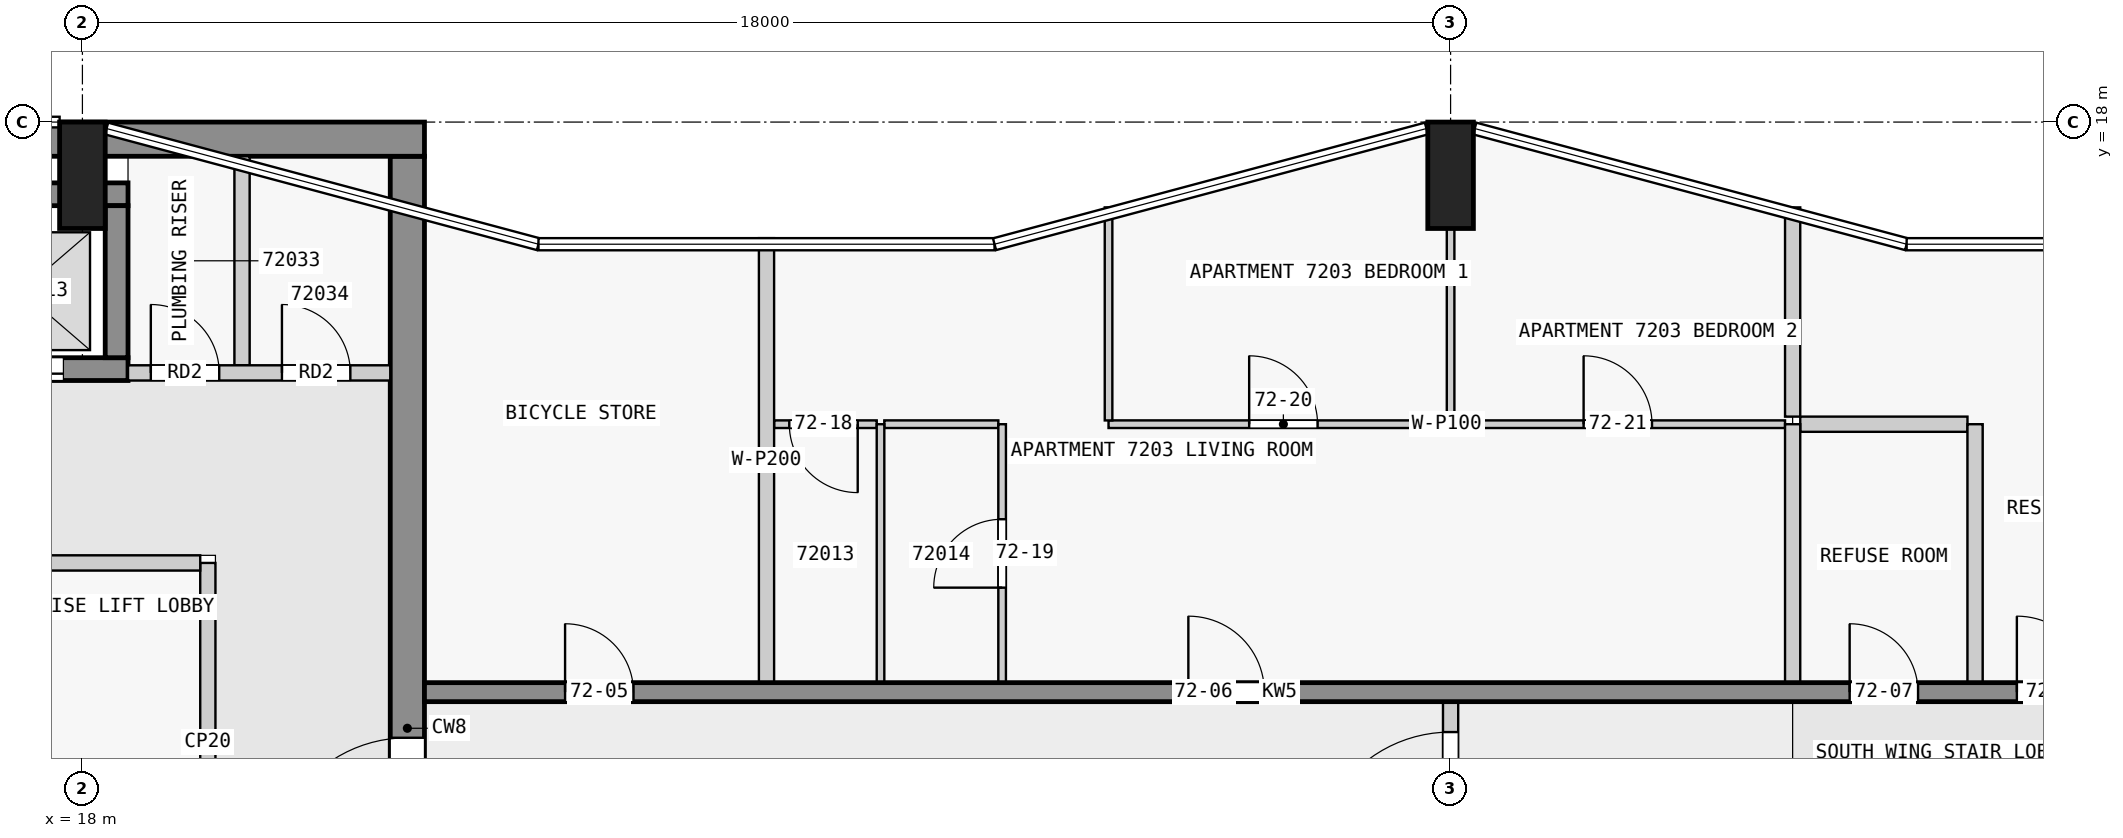
"""IFC4 building model, lengths in metres.
Left out: names, types, materials, properties, quantities, classifications, styles, units other than length and angle.
Written with IfcOpenShell. Run it as: python <this file> out.ifc"""

import sys

from ifc_helpers import new_model, si_unit, direction, frame, frame_2d, origin, origin_2d, place, context, subcontext, project, spatial, rectangle, extrude, element, fill, save


model = new_model("IFC4")
c1 = context("Model", 3, precision=1e-05, world=origin(), true_north=direction((0.0, 1.0)))
c2 = subcontext(c1, "Body", "Model", "MODEL_VIEW")
j1 = project(units=[si_unit("LENGTHUNIT", "METRE"), si_unit("PLANEANGLEUNIT", "RADIAN")], contexts=[c1])
p1 = place(None, origin())
s1 = spatial("IfcSite", under=j1, at=p1, CompositionType="ELEMENT")
p2 = place(p1, origin())
s2 = spatial("IfcBuilding", under=s1, at=p2, CompositionType="ELEMENT")
p3 = place(p2, frame((0.0, 0.0, 273.9)))
s3 = spatial("IfcBuildingStorey", under=s2, at=p3, CompositionType="ELEMENT", Elevation=273.9)
for number, where, z_axis, x_axis in (
    (1, (36.0, 17.3, 0.0), (0.0, 0.0, 1.0), (1.0, 0.0, 0.0)),
    (2, (18.0, 17.3, 0.0), (0.0, 0.0, 1.0), (1.0, 0.0, 0.0)),
):
    element("IfcColumn", number, at=place(p3, frame(where, z_axis=z_axis, x_axis=x_axis)), inside=s3, PredefinedType="COLUMN", context=c2, shape_type="SweptSolid", body=[
        extrude(rectangle(XDim=0.6, YDim=1.4, at=origin_2d()), origin(), (0.0, 0.0, 1.0), 3.5),
    ])
p4 = place(p3, frame((1.85, 17.775, 0.0), z_axis=(0.0, 0.0, 1.0), x_axis=(1.0, 0.0, 0.0)))
e3 = element("IfcWall", 3, at=p4, inside=s3, PredefinedType="SHEAR", context=c2, shape_type="SweptSolid", body=[
    extrude(rectangle(XDim=20.65, YDim=0.45, at=frame_2d((10.325, 0.0))), origin(), (0.0, 0.0, 1.0), 3.25),
])
p5 = place(p3, frame((22.275, 2.5, 0.0), z_axis=(0.0, 0.0, 1.0), x_axis=(0.0, 1.0, 0.0)))
e4 = element("IfcWall", 4, at=p5, inside=s3, PredefinedType="SHEAR", context=c2, shape_type="SweptSolid", body=[
    extrude(rectangle(XDim=15.05, YDim=0.45, at=frame_2d((7.525, 0.0))), origin(), (0.0, 0.0, 1.0), 3.25),
])
p6 = place(p5, frame((5.6, 0.0, 0.0)))
e5 = element("IfcOpeningElement", 5, at=p6, cuts=e4, PredefinedType="OPENING", context=c2, shape_type="SweptSolid", body=[
    extrude(rectangle(XDim=1.8, YDim=2.1, at=frame_2d((0.9, 1.05))), frame((0.0, 0.235, 0.0), z_axis=(0.0, -1.0, 0.0), x_axis=(1.0, 0.0, 0.0)), (0.0, 0.0, 1.0), 0.47),
])
p7 = place(p3, frame((10.8, 17.05, 0.0), z_axis=(0.0, 0.0, 1.0), x_axis=(1.0, 0.0, 0.0)))
e6 = element("IfcWall", 6, at=p7, inside=s3, PredefinedType="SHEAR", context=c2, shape_type="SweptSolid", body=[
    extrude(rectangle(XDim=7.8, YDim=0.3, at=frame_2d((3.9, 0.0))), origin(), (0.0, 0.0, 1.0), 3.25),
])
p8 = place(p3, frame((10.8, 14.75, 0.0), z_axis=(0.0, 0.0, 1.0), x_axis=(1.0, 0.0, 0.0)))
e7 = element("IfcWall", 7, at=p8, inside=s3, PredefinedType="SHEAR", context=c2, shape_type="SweptSolid", body=[
    extrude(rectangle(XDim=7.8, YDim=0.3, at=frame_2d((3.9, 0.0))), origin(), (0.0, 0.0, 1.0), 3.25),
])
p9 = place(p8, frame((0.85, 0.0, 0.0)))
e8 = element("IfcOpeningElement", 8, at=p9, cuts=e7, PredefinedType="OPENING", context=c2, shape_type="SweptSolid", body=[
    extrude(rectangle(XDim=1.1, YDim=2.1, at=frame_2d((0.55, 1.05))), frame((0.0, 0.16, 0.0), z_axis=(0.0, -1.0, 0.0), x_axis=(1.0, 0.0, 0.0)), (0.0, 0.0, 1.0), 0.32),
])
p10 = place(p8, frame((3.35, 0.0, 0.0)))
e9 = element("IfcOpeningElement", 9, at=p10, cuts=e7, PredefinedType="OPENING", context=c2, shape_type="SweptSolid", body=[
    extrude(rectangle(XDim=1.1, YDim=2.1, at=frame_2d((0.55, 1.05))), frame((0.0, 0.16, 0.0), z_axis=(0.0, -1.0, 0.0), x_axis=(1.0, 0.0, 0.0)), (0.0, 0.0, 1.0), 0.32),
])
p11 = place(p8, frame((5.85, 0.0, 0.0)))
e10 = element("IfcOpeningElement", 10, at=p11, cuts=e7, PredefinedType="OPENING", context=c2, shape_type="SweptSolid", body=[
    extrude(rectangle(XDim=1.1, YDim=2.1, at=frame_2d((0.55, 1.05))), frame((0.0, 0.16, 0.0), z_axis=(0.0, -1.0, 0.0), x_axis=(1.0, 0.0, 0.0)), (0.0, 0.0, 1.0), 0.32),
])
p12 = place(p3, frame((18.45, 14.9, 0.0), z_axis=(0.0, 0.0, 1.0), x_axis=(0.0, 1.0, 0.0)))
e11 = element("IfcWall", 11, at=p12, inside=s3, PredefinedType="SHEAR", context=c2, shape_type="SweptSolid", body=[
    extrude(rectangle(XDim=2.0, YDim=0.3, at=frame_2d((1.0, 0.0))), origin(), (0.0, 0.0, 1.0), 3.25),
])
p13 = place(p3, frame((22.5, 10.5, 0.0), z_axis=(0.0, 0.0, 1.0), x_axis=(1.0, 0.0, 0.0)))
e12 = element("IfcWall", 12, at=p13, inside=s3, PredefinedType="SHEAR", context=c2, shape_type="SweptSolid", body=[
    extrude(rectangle(XDim=22.5, YDim=0.25, at=frame_2d((11.25, 0.0))), origin(), (0.0, 0.0, 1.0), 3.25),
])
p14 = place(p13, frame((1.85, 0.0, 0.0)))
e13 = element("IfcOpeningElement", 13, at=p14, cuts=e12, PredefinedType="OPENING", context=c2, shape_type="SweptSolid", body=[
    extrude(rectangle(XDim=0.9, YDim=2.1, at=frame_2d((0.45, 1.05))), frame((0.0, 0.135, 0.0), z_axis=(0.0, -1.0, 0.0), x_axis=(1.0, 0.0, 0.0)), (0.0, 0.0, 1.0), 0.27),
])
p15 = place(p13, frame((10.05, 0.0, 0.0)))
e14 = element("IfcOpeningElement", 14, at=p15, cuts=e12, PredefinedType="OPENING", context=c2, shape_type="SweptSolid", body=[
    extrude(rectangle(XDim=1.0, YDim=2.1, at=frame_2d((0.5, 1.05))), frame((0.0, 0.135, 0.0), z_axis=(0.0, -1.0, 0.0), x_axis=(1.0, 0.0, 0.0)), (0.0, 0.0, 1.0), 0.27),
])
p16 = place(p13, frame((18.75, 0.0, 0.0)))
e15 = element("IfcOpeningElement", 15, at=p16, cuts=e12, PredefinedType="OPENING", context=c2, shape_type="SweptSolid", body=[
    extrude(rectangle(XDim=0.9, YDim=2.1, at=frame_2d((0.45, 1.05))), frame((0.0, 0.135, 0.0), z_axis=(0.0, -1.0, 0.0), x_axis=(1.0, 0.0, 0.0)), (0.0, 0.0, 1.0), 0.27),
])
p17 = place(p13, frame((20.95, 0.0, 0.0)))
e16 = element("IfcOpeningElement", 16, at=p17, cuts=e12, PredefinedType="OPENING", context=c2, shape_type="SweptSolid", body=[
    extrude(rectangle(XDim=1.0, YDim=2.1, at=frame_2d((0.5, 1.05))), frame((0.0, 0.135, 0.0), z_axis=(0.0, -1.0, 0.0), x_axis=(1.0, 0.0, 0.0)), (0.0, 0.0, 1.0), 0.27),
])
p18 = place(p3, frame((19.65, 7.5, 0.0), z_axis=(0.0, 0.0, 1.0), x_axis=(0.0, 1.0, 0.0)))
e17 = element("IfcWall", 17, at=p18, inside=s3, PredefinedType="PARTITIONING", context=c2, shape_type="SweptSolid", body=[
    extrude(rectangle(XDim=4.7, YDim=0.2, at=frame_2d((2.35, 0.0))), origin(), (0.0, 0.0, 1.0), 3.25),
])
p19 = place(p3, frame((10.9, 12.2, 0.0), z_axis=(0.0, 0.0, 1.0), x_axis=(1.0, 0.0, 0.0)))
e18 = element("IfcWall", 18, at=p19, inside=s3, PredefinedType="PARTITIONING", context=c2, shape_type="SweptSolid", body=[
    extrude(rectangle(XDim=8.65, YDim=0.2, at=frame_2d((4.325, 0.0))), origin(), (0.0, 0.0, 1.0), 3.25),
])
p20 = place(p19, frame((3.875, 0.0, 0.0)))
e19 = element("IfcOpeningElement", 19, at=p20, cuts=e18, PredefinedType="OPENING", context=c2, shape_type="SweptSolid", body=[
    extrude(rectangle(XDim=0.9, YDim=2.1, at=frame_2d((0.45, 1.05))), frame((0.0, 0.11, 0.0), z_axis=(0.0, -1.0, 0.0), x_axis=(1.0, 0.0, 0.0)), (0.0, 0.0, 1.0), 0.22),
])
p21 = place(p3, frame((18.6, 14.7, 0.0), z_axis=(0.0, 0.0, 1.0), x_axis=(1.0, 0.0, 0.0)))
e20 = element("IfcWall", 20, at=p21, inside=s3, PredefinedType="PARTITIONING", context=c2, shape_type="SweptSolid", body=[
    extrude(rectangle(XDim=3.45, YDim=0.2, at=frame_2d((1.725, 0.0))), origin(), (0.0, 0.0, 1.0), 3.25),
])
p22 = place(p21, frame((0.3, 0.0, 0.0)))
e21 = element("IfcOpeningElement", 21, at=p22, cuts=e20, PredefinedType="OPENING", context=c2, shape_type="SweptSolid", body=[
    extrude(rectangle(XDim=0.9, YDim=2.1, at=frame_2d((0.45, 1.05))), frame((0.0, 0.11, 0.0), z_axis=(0.0, -1.0, 0.0), x_axis=(1.0, 0.0, 0.0)), (0.0, 0.0, 1.0), 0.22),
])
p23 = place(p21, frame((2.025, 0.0, 0.0)))
e22 = element("IfcOpeningElement", 22, at=p23, cuts=e20, PredefinedType="OPENING", context=c2, shape_type="SweptSolid", body=[
    extrude(rectangle(XDim=0.9, YDim=2.1, at=frame_2d((0.45, 1.05))), frame((0.0, 0.11, 0.0), z_axis=(0.0, -1.0, 0.0), x_axis=(1.0, 0.0, 0.0)), (0.0, 0.0, 1.0), 0.22),
])
p24 = place(p3, frame((20.1, 14.8, 0.0), z_axis=(0.0, 0.0, 1.0), x_axis=(0.0, 1.0, 0.0)))
e23 = element("IfcWall", 23, at=p24, inside=s3, PredefinedType="PARTITIONING", context=c2, shape_type="SweptSolid", body=[
    extrude(rectangle(XDim=2.75, YDim=0.2, at=frame_2d((1.375, 0.0))), origin(), (0.0, 0.0, 1.0), 3.25),
])
p25 = place(p3, frame((28.45, 14.025, 0.0), z_axis=(0.0, 0.0, 1.0), x_axis=(-1.0, 0.0, 0.0)))
e24 = element("IfcWall", 24, at=p25, inside=s3, PredefinedType="PARTITIONING", context=c2, shape_type="SweptSolid", body=[
    extrude(rectangle(XDim=1.35, YDim=0.1, at=frame_2d((0.675, 0.0))), origin(), (0.0, 0.0, 1.0), 3.25),
])
p26 = place(p25, frame((0.25, 0.0, 0.0)))
e25 = element("IfcOpeningElement", 25, at=p26, cuts=e24, PredefinedType="OPENING", context=c2, shape_type="SweptSolid", body=[
    extrude(rectangle(XDim=0.9, YDim=2.1, at=frame_2d((0.45, 1.05))), frame((0.0, 0.06, 0.0), z_axis=(0.0, -1.0, 0.0), x_axis=(1.0, 0.0, 0.0)), (0.0, 0.0, 1.0), 0.12),
])
p27 = place(p3, frame((30.05, 14.025, 0.0), z_axis=(0.0, 0.0, 1.0), x_axis=(-1.0, 0.0, 0.0)))
e26 = element("IfcWall", 26, at=p27, inside=s3, PredefinedType="PARTITIONING", context=c2, shape_type="SweptSolid", body=[
    extrude(rectangle(XDim=1.5, YDim=0.1, at=frame_2d((0.75, 0.0))), origin(), (0.0, 0.0, 1.0), 3.25),
])
p28 = place(p3, frame((31.5, 14.025, 0.0), z_axis=(0.0, 0.0, 1.0), x_axis=(1.0, 0.0, 0.0)))
e27 = element("IfcWall", 27, at=p28, inside=s3, PredefinedType="PARTITIONING", context=c2, shape_type="SweptSolid", body=[
    extrude(rectangle(XDim=8.9, YDim=0.1, at=frame_2d((4.45, 0.0))), origin(), (0.0, 0.0, 1.0), 3.25),
])
p29 = place(p28, frame((1.85, 0.0, 0.0)))
e28 = element("IfcOpeningElement", 28, at=p29, cuts=e27, PredefinedType="OPENING", context=c2, shape_type="SweptSolid", body=[
    extrude(rectangle(XDim=0.9, YDim=2.1, at=frame_2d((0.45, 1.05))), frame((0.0, 0.06, 0.0), z_axis=(0.0, -1.0, 0.0), x_axis=(1.0, 0.0, 0.0)), (0.0, 0.0, 1.0), 0.12),
])
p30 = place(p28, frame((6.25, 0.0, 0.0)))
e29 = element("IfcOpeningElement", 29, at=p30, cuts=e27, PredefinedType="OPENING", context=c2, shape_type="SweptSolid", body=[
    extrude(rectangle(XDim=0.9, YDim=2.1, at=frame_2d((0.45, 1.05))), frame((0.0, 0.06, 0.0), z_axis=(0.0, -1.0, 0.0), x_axis=(1.0, 0.0, 0.0)), (0.0, 0.0, 1.0), 0.12),
])
p31 = place(p3, frame((42.8, 14.025, 0.0), z_axis=(0.0, 0.0, 1.0), x_axis=(-1.0, 0.0, 0.0)))
e30 = element("IfcWall", 30, at=p31, inside=s3, PredefinedType="PARTITIONING", context=c2, shape_type="SweptSolid", body=[
    extrude(rectangle(XDim=2.2, YDim=0.2, at=frame_2d((1.1, 0.0))), origin(), (0.0, 0.0, 1.0), 3.25),
])
p32 = place(p3, frame((27.0, 10.625, 0.0), z_axis=(0.0, 0.0, 1.0), x_axis=(0.0, 1.0, 0.0)))
e31 = element("IfcWall", 31, at=p32, inside=s3, PredefinedType="PARTITIONING", context=c2, shape_type="SweptSolid", body=[
    extrude(rectangle(XDim=5.848, YDim=0.2, at=frame_2d((2.924, 0.0))), origin(), (0.0, 0.0, 1.0), 3.25),
])
p33 = place(p3, frame((28.5, 10.625, 0.0), z_axis=(0.0, 0.0, 1.0), x_axis=(0.0, 1.0, 0.0)))
e32 = element("IfcWall", 32, at=p33, inside=s3, PredefinedType="PARTITIONING", context=c2, shape_type="SweptSolid", body=[
    extrude(rectangle(XDim=3.4, YDim=0.1, at=frame_2d((1.7, 0.0))), origin(), (0.0, 0.0, 1.0), 3.25),
])
p34 = place(p3, frame((30.1, 10.625, 0.0), z_axis=(0.0, 0.0, 1.0), x_axis=(0.0, 1.0, 0.0)))
e33 = element("IfcWall", 33, at=p34, inside=s3, PredefinedType="PARTITIONING", context=c2, shape_type="SweptSolid", body=[
    extrude(rectangle(XDim=3.4, YDim=0.1, at=frame_2d((1.7, 0.0))), origin(), (0.0, 0.0, 1.0), 3.25),
])
p35 = place(p34, frame((1.25, 0.0, 0.0)))
e34 = element("IfcOpeningElement", 34, at=p35, cuts=e33, PredefinedType="OPENING", context=c2, shape_type="SweptSolid", body=[
    extrude(rectangle(XDim=0.9, YDim=2.1, at=frame_2d((0.45, 1.05))), frame((0.0, 0.06, 0.0), z_axis=(0.0, -1.0, 0.0), x_axis=(1.0, 0.0, 0.0)), (0.0, 0.0, 1.0), 0.12),
])
p36 = place(p3, frame((31.5, 16.878, 0.0), z_axis=(0.0, 0.0, 1.0), x_axis=(0.0, -1.0, 0.0)))
e35 = element("IfcWall", 35, at=p36, inside=s3, PredefinedType="PARTITIONING", context=c2, shape_type="SweptSolid", body=[
    extrude(rectangle(XDim=2.803, YDim=0.1, at=frame_2d((1.401, 0.0))), origin(), (0.0, 0.0, 1.0), 3.25),
])
p37 = place(p3, frame((36.0, 14.075, 0.0), z_axis=(0.0, 0.0, 1.0), x_axis=(0.0, 1.0, 0.0)))
e36 = element("IfcWall", 36, at=p37, inside=s3, PredefinedType="PARTITIONING", context=c2, shape_type="SweptSolid", body=[
    extrude(rectangle(XDim=2.525, YDim=0.1, at=frame_2d((1.263, 0.0))), origin(), (0.0, 0.0, 1.0), 3.25),
])
p38 = place(p3, frame((40.5, 14.025, 0.0), z_axis=(0.0, 0.0, 1.0), x_axis=(0.0, -1.0, 0.0)))
e37 = element("IfcWall", 37, at=p38, inside=s3, PredefinedType="PARTITIONING", context=c2, shape_type="SweptSolid", body=[
    extrude(rectangle(XDim=3.4, YDim=0.2, at=frame_2d((1.7, 0.0))), origin(), (0.0, 0.0, 1.0), 3.25),
])
p39 = place(p3, frame((40.5, 14.125, 0.0), z_axis=(0.0, 0.0, 1.0), x_axis=(0.0, 1.0, 0.0)))
e38 = element("IfcWall", 38, at=p39, inside=s3, PredefinedType="PARTITIONING", context=c2, shape_type="SweptSolid", body=[
    extrude(rectangle(XDim=2.753, YDim=0.2, at=frame_2d((1.376, 0.0))), origin(), (0.0, 0.0, 1.0), 3.25),
])
p40 = place(p3, frame((42.9, 10.625, 0.0), z_axis=(0.0, 0.0, 1.0), x_axis=(0.0, 1.0, 0.0)))
e39 = element("IfcWall", 39, at=p40, inside=s3, PredefinedType="PARTITIONING", context=c2, shape_type="SweptSolid", body=[
    extrude(rectangle(XDim=3.4, YDim=0.2, at=frame_2d((1.7, 0.0))), origin(), (0.0, 0.0, 1.0), 3.25),
])
p41 = place(p3, frame((36.0, 7.475, 0.0), z_axis=(0.0, 0.0, 1.0), x_axis=(0.0, 1.0, 0.0)))
e40 = element("IfcWall", 40, at=p41, inside=s3, PredefinedType="PARTITIONING", context=c2, shape_type="SweptSolid", body=[
    extrude(rectangle(XDim=3.15, YDim=0.2, at=frame_2d((1.575, 0.0))), origin(), (0.0, 0.0, 1.0), 3.25),
])
p42 = place(p41, frame((0.7, 0.0, 0.0)))
e41 = element("IfcOpeningElement", 41, at=p42, cuts=e40, PredefinedType="OPENING", context=c2, shape_type="SweptSolid", body=[
    extrude(rectangle(XDim=1.8, YDim=2.1, at=frame_2d((0.9, 1.05))), frame((0.0, 0.11, 0.0), z_axis=(0.0, -1.0, 0.0), x_axis=(1.0, 0.0, 0.0)), (0.0, 0.0, 1.0), 0.22),
])
p43 = place(p11, origin())
e42 = element("IfcDoor", 42, at=p43, inside=s3, OperationType="DOUBLE_DOOR_SLIDING", PredefinedType="DOOR", context=c2, shape_type="SweptSolid", body=[
    extrude(rectangle(XDim=1.1, YDim=2.1, at=frame_2d((0.55, 1.05))), frame((0.0, 0.025, 0.0), z_axis=(0.0, -1.0, 0.0), x_axis=(1.0, 0.0, 0.0)), (0.0, 0.0, 1.0), 0.05),
])
fill(e10, e42)
p44 = place(p6, origin())
e43 = element("IfcDoor", 43, at=p44, inside=s3, OperationType="DOUBLE_DOOR_SINGLE_SWING", PredefinedType="DOOR", context=c2, shape_type="SweptSolid", body=[
    extrude(rectangle(XDim=1.8, YDim=2.1, at=frame_2d((0.9, 1.05))), frame((0.0, 0.025, 0.0), z_axis=(0.0, -1.0, 0.0), x_axis=(1.0, 0.0, 0.0)), (0.0, 0.0, 1.0), 0.05),
])
fill(e5, e43)
p45 = place(p22, origin())
e44 = element("IfcDoor", 44, at=p45, inside=s3, OperationType="SINGLE_SWING_LEFT", PredefinedType="DOOR", context=c2, shape_type="SweptSolid", body=[
    extrude(rectangle(XDim=0.9, YDim=2.1, at=frame_2d((0.45, 1.05))), frame((0.0, 0.025, 0.0), z_axis=(0.0, -1.0, 0.0), x_axis=(1.0, 0.0, 0.0)), (0.0, 0.0, 1.0), 0.05),
])
fill(e21, e44)
p46 = place(p23, origin())
e45 = element("IfcDoor", 45, at=p46, inside=s3, OperationType="SINGLE_SWING_LEFT", PredefinedType="DOOR", context=c2, shape_type="SweptSolid", body=[
    extrude(rectangle(XDim=0.9, YDim=2.1, at=frame_2d((0.45, 1.05))), frame((0.0, 0.025, 0.0), z_axis=(0.0, -1.0, 0.0), x_axis=(1.0, 0.0, 0.0)), (0.0, 0.0, 1.0), 0.05),
])
fill(e22, e45)
p47 = place(p14, origin())
e46 = element("IfcDoor", 46, at=p47, inside=s3, OperationType="SINGLE_SWING_LEFT", PredefinedType="DOOR", context=c2, shape_type="SweptSolid", body=[
    extrude(rectangle(XDim=0.9, YDim=2.1, at=frame_2d((0.45, 1.05))), frame((0.0, 0.025, 0.0), z_axis=(0.0, -1.0, 0.0), x_axis=(1.0, 0.0, 0.0)), (0.0, 0.0, 1.0), 0.05),
])
fill(e13, e46)
p48 = place(p15, origin())
e47 = element("IfcDoor", 47, at=p48, inside=s3, OperationType="SINGLE_SWING_LEFT", PredefinedType="DOOR", context=c2, shape_type="SweptSolid", body=[
    extrude(rectangle(XDim=1.0, YDim=2.1, at=frame_2d((0.5, 1.05))), frame((0.0, 0.025, 0.0), z_axis=(0.0, -1.0, 0.0), x_axis=(1.0, 0.0, 0.0)), (0.0, 0.0, 1.0), 0.05),
])
fill(e14, e47)
p49 = place(p16, origin())
e48 = element("IfcDoor", 48, at=p49, inside=s3, OperationType="SINGLE_SWING_RIGHT", PredefinedType="DOOR", context=c2, shape_type="SweptSolid", body=[
    extrude(rectangle(XDim=0.9, YDim=2.1, at=frame_2d((0.45, 1.05))), frame((0.0, 0.025, 0.0), z_axis=(0.0, -1.0, 0.0), x_axis=(1.0, 0.0, 0.0)), (0.0, 0.0, 1.0), 0.05),
])
fill(e15, e48)
p50 = place(p17, origin())
e49 = element("IfcDoor", 49, at=p50, inside=s3, OperationType="SINGLE_SWING_RIGHT", PredefinedType="DOOR", context=c2, shape_type="SweptSolid", body=[
    extrude(rectangle(XDim=1.0, YDim=2.1, at=frame_2d((0.5, 1.05))), frame((0.0, 0.025, 0.0), z_axis=(0.0, -1.0, 0.0), x_axis=(1.0, 0.0, 0.0)), (0.0, 0.0, 1.0), 0.05),
])
fill(e16, e49)
p51 = place(p42, origin())
e50 = element("IfcDoor", 50, at=p51, inside=s3, OperationType="SINGLE_SWING_RIGHT", PredefinedType="DOOR", context=c2, shape_type="SweptSolid", body=[
    extrude(rectangle(XDim=1.8, YDim=2.1, at=frame_2d((0.9, 1.05))), frame((0.0, 0.025, 0.0), z_axis=(0.0, -1.0, 0.0), x_axis=(1.0, 0.0, 0.0)), (0.0, 0.0, 1.0), 0.05),
])
fill(e41, e50)
p52 = place(p26, origin())
e51 = element("IfcDoor", 51, at=p52, inside=s3, OperationType="SINGLE_SWING_RIGHT", PredefinedType="DOOR", context=c2, shape_type="SweptSolid", body=[
    extrude(rectangle(XDim=0.9, YDim=2.1, at=frame_2d((0.45, 1.05))), frame((0.0, 0.025, 0.0), z_axis=(0.0, -1.0, 0.0), x_axis=(1.0, 0.0, 0.0)), (0.0, 0.0, 1.0), 0.05),
])
fill(e25, e51)
p53 = place(p35, origin())
e52 = element("IfcDoor", 52, at=p53, inside=s3, OperationType="SINGLE_SWING_LEFT", PredefinedType="DOOR", context=c2, shape_type="SweptSolid", body=[
    extrude(rectangle(XDim=0.9, YDim=2.1, at=frame_2d((0.45, 1.05))), frame((0.0, 0.025, 0.0), z_axis=(0.0, -1.0, 0.0), x_axis=(1.0, 0.0, 0.0)), (0.0, 0.0, 1.0), 0.05),
])
fill(e34, e52)
p54 = place(p29, origin())
e53 = element("IfcDoor", 53, at=p54, inside=s3, OperationType="SINGLE_SWING_LEFT", PredefinedType="DOOR", context=c2, shape_type="SweptSolid", body=[
    extrude(rectangle(XDim=0.9, YDim=2.1, at=frame_2d((0.45, 1.05))), frame((0.0, 0.025, 0.0), z_axis=(0.0, -1.0, 0.0), x_axis=(1.0, 0.0, 0.0)), (0.0, 0.0, 1.0), 0.05),
])
fill(e28, e53)
p55 = place(p30, origin())
e54 = element("IfcDoor", 54, at=p55, inside=s3, OperationType="SINGLE_SWING_RIGHT", PredefinedType="DOOR", context=c2, shape_type="SweptSolid", body=[
    extrude(rectangle(XDim=0.9, YDim=2.1, at=frame_2d((0.45, 1.05))), frame((0.0, 0.025, 0.0), z_axis=(0.0, -1.0, 0.0), x_axis=(1.0, 0.0, 0.0)), (0.0, 0.0, 1.0), 0.05),
])
fill(e29, e54)
save(model, sys.argv[1])
